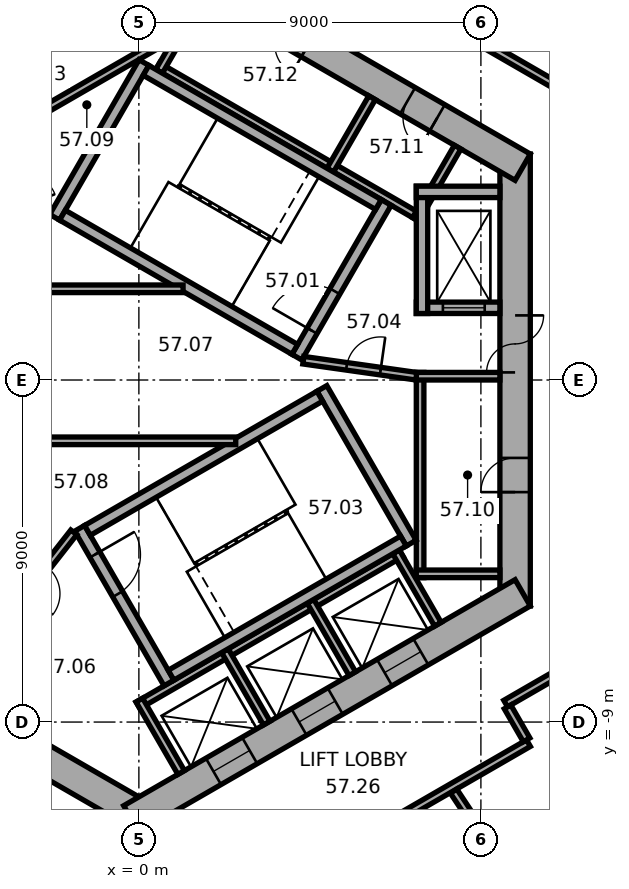
"""IFC4 building model, lengths in metres.
Left out: names, types, materials, properties, quantities, classifications, styles, units other than length and angle.
Written with IfcOpenShell. Run it as: python <this file> out.ifc"""

import sys

from ifc_helpers import new_model, si_unit, direction, frame, frame_2d, origin, place, context, subcontext, project, spatial, rectangle, extrude, element, fill, save


model = new_model("IFC4")
c1 = context("Model", 3, precision=1e-05, world=origin(), true_north=direction((0.0, 1.0)))
c2 = subcontext(c1, "Body", "Model", "MODEL_VIEW")
j1 = project(units=[si_unit("LENGTHUNIT", "METRE"), si_unit("PLANEANGLEUNIT", "RADIAN")], contexts=[c1])
p1 = place(None, origin())
s1 = spatial("IfcSite", under=j1, at=p1, CompositionType="ELEMENT")
p2 = place(p1, origin())
s2 = spatial("IfcBuilding", under=s1, at=p2, CompositionType="ELEMENT")
p3 = place(p2, frame((0.0, 0.0, 232.8)))
s3 = spatial("IfcBuildingStorey", under=s2, at=p3, CompositionType="ELEMENT", Elevation=232.8)
p4 = place(p3, frame((9.9, -5.947, 0.0), z_axis=(0.0, 0.0, 1.0), x_axis=(0.0, 1.0, 0.0)))
e1 = element("IfcWall", 1, at=p4, inside=s3, PredefinedType="SHEAR", context=c2, shape_type="SweptSolid", body=[
    extrude(rectangle(XDim=11.894, YDim=0.8, at=frame_2d((5.947, 0.0))), origin(), (0.0, 0.0, 1.0), 3.7),
])
p5 = place(p4, frame((6.147, 0.0, 0.0)))
e2 = element("IfcOpeningElement", 2, at=p5, cuts=e1, PredefinedType="OPENING", context=c2, shape_type="SweptSolid", body=[
    extrude(rectangle(XDim=1.5, YDim=2.1, at=frame_2d((0.75, 1.05))), frame((0.0, 0.41, 0.0), z_axis=(0.0, -1.0, 0.0), x_axis=(1.0, 0.0, 0.0)), (0.0, 0.0, 1.0), 0.82),
])
p6 = place(p4, frame((2.997, 0.0, 0.0)))
e3 = element("IfcOpeningElement", 3, at=p6, cuts=e1, PredefinedType="OPENING", context=c2, shape_type="SweptSolid", body=[
    extrude(rectangle(XDim=0.9, YDim=2.1, at=frame_2d((0.45, 1.05))), frame((0.0, 0.41, 0.0), z_axis=(0.0, -1.0, 0.0), x_axis=(1.0, 0.0, 0.0)), (0.0, 0.0, 1.0), 0.82),
])
p7 = place(p3, frame((10.1, 5.6, 0.0), z_axis=(0.0, 0.0, 1.0), x_axis=(-0.866023897231, 0.500002609418, 0.0)))
e4 = element("IfcWall", 4, at=p7, inside=s3, PredefinedType="SHEAR", context=c2, shape_type="SweptSolid", body=[
    extrude(rectangle(XDim=11.894, YDim=0.8, at=frame_2d((5.947, 0.0))), origin(), (0.0, 0.0, 1.0), 3.7),
])
p8 = place(p7, frame((2.597, 0.0, 0.0)))
e5 = element("IfcOpeningElement", 5, at=p8, cuts=e4, PredefinedType="OPENING", context=c2, shape_type="SweptSolid", body=[
    extrude(rectangle(XDim=0.9, YDim=2.1, at=frame_2d((0.45, 1.05))), frame((0.0, 0.41, 0.0), z_axis=(0.0, -1.0, 0.0), x_axis=(1.0, 0.0, 0.0)), (0.0, 0.0, 1.0), 0.82),
])
p9 = place(p7, frame((6.497, 0.0, 0.0)))
e6 = element("IfcOpeningElement", 6, at=p9, cuts=e4, PredefinedType="OPENING", context=c2, shape_type="SweptSolid", body=[
    extrude(rectangle(XDim=0.9, YDim=2.1, at=frame_2d((0.45, 1.05))), frame((0.0, 0.41, 0.0), z_axis=(0.0, -1.0, 0.0), x_axis=(1.0, 0.0, 0.0)), (0.0, 0.0, 1.0), 0.82),
])
p10 = place(p3, frame((0.2, 11.547, 0.0), z_axis=(0.0, 0.0, 1.0), x_axis=(-0.866023897231, -0.500002609418, 0.0)))
e7 = element("IfcWall", 7, at=p10, inside=s3, PredefinedType="SHEAR", context=c2, shape_type="SweptSolid", body=[
    extrude(rectangle(XDim=11.894, YDim=0.8, at=frame_2d((5.947, 0.0))), origin(), (0.0, 0.0, 1.0), 3.7),
])
p11 = place(p10, frame((6.147, 0.0, 0.0)))
e8 = element("IfcOpeningElement", 8, at=p11, cuts=e7, PredefinedType="OPENING", context=c2, shape_type="SweptSolid", body=[
    extrude(rectangle(XDim=1.5, YDim=2.1, at=frame_2d((0.75, 1.05))), frame((0.0, 0.41, 0.0), z_axis=(0.0, -1.0, 0.0), x_axis=(1.0, 0.0, 0.0)), (0.0, 0.0, 1.0), 0.82),
])
p12 = place(p10, frame((2.997, 0.0, 0.0)))
e9 = element("IfcOpeningElement", 9, at=p12, cuts=e7, PredefinedType="OPENING", context=c2, shape_type="SweptSolid", body=[
    extrude(rectangle(XDim=0.9, YDim=2.1, at=frame_2d((0.45, 1.05))), frame((0.0, 0.41, 0.0), z_axis=(0.0, -1.0, 0.0), x_axis=(1.0, 0.0, 0.0)), (0.0, 0.0, 1.0), 0.82),
])
p13 = place(p3, frame((-10.1, -5.6, 0.0), z_axis=(0.0, 0.0, 1.0), x_axis=(0.866023897231, -0.500002609418, 0.0)))
e10 = element("IfcWall", 10, at=p13, inside=s3, PredefinedType="SHEAR", context=c2, shape_type="SweptSolid", body=[
    extrude(rectangle(XDim=11.894, YDim=0.8, at=frame_2d((5.947, 0.0))), origin(), (0.0, 0.0, 1.0), 3.7),
])
p14 = place(p13, frame((6.147, 0.0, 0.0)))
e11 = element("IfcOpeningElement", 11, at=p14, cuts=e10, PredefinedType="OPENING", context=c2, shape_type="SweptSolid", body=[
    extrude(rectangle(XDim=1.5, YDim=2.1, at=frame_2d((0.75, 1.05))), frame((0.0, 0.41, 0.0), z_axis=(0.0, -1.0, 0.0), x_axis=(1.0, 0.0, 0.0)), (0.0, 0.0, 1.0), 0.82),
])
p15 = place(p13, frame((1.597, 0.0, 0.0)))
e12 = element("IfcOpeningElement", 12, at=p15, cuts=e10, PredefinedType="OPENING", context=c2, shape_type="SweptSolid", body=[
    extrude(rectangle(XDim=1.1, YDim=2.1, at=frame_2d((0.55, 1.05))), frame((0.0, 0.41, 0.0), z_axis=(0.0, -1.0, 0.0), x_axis=(1.0, 0.0, 0.0)), (0.0, 0.0, 1.0), 0.82),
])
p16 = place(p13, frame((4.197, 0.0, 0.0)))
e13 = element("IfcOpeningElement", 13, at=p16, cuts=e10, PredefinedType="OPENING", context=c2, shape_type="SweptSolid", body=[
    extrude(rectangle(XDim=1.1, YDim=2.1, at=frame_2d((0.55, 1.05))), frame((0.0, 0.41, 0.0), z_axis=(0.0, -1.0, 0.0), x_axis=(1.0, 0.0, 0.0)), (0.0, 0.0, 1.0), 0.82),
])
p17 = place(p3, frame((-0.2, -11.547, 0.0), z_axis=(0.0, 0.0, 1.0), x_axis=(0.866023897231, 0.500002609418, 0.0)))
e14 = element("IfcWall", 14, at=p17, inside=s3, PredefinedType="SHEAR", context=c2, shape_type="SweptSolid", body=[
    extrude(rectangle(XDim=11.894, YDim=0.8, at=frame_2d((5.947, 0.0))), origin(), (0.0, 0.0, 1.0), 3.7),
])
p18 = place(p17, frame((2.497, 0.0, 0.0)))
e15 = element("IfcOpeningElement", 15, at=p18, cuts=e14, PredefinedType="OPENING", context=c2, shape_type="SweptSolid", body=[
    extrude(rectangle(XDim=1.1, YDim=2.1, at=frame_2d((0.55, 1.05))), frame((0.0, 0.41, 0.0), z_axis=(0.0, -1.0, 0.0), x_axis=(1.0, 0.0, 0.0)), (0.0, 0.0, 1.0), 0.82),
])
p19 = place(p17, frame((5.097, 0.0, 0.0)))
e16 = element("IfcOpeningElement", 16, at=p19, cuts=e14, PredefinedType="OPENING", context=c2, shape_type="SweptSolid", body=[
    extrude(rectangle(XDim=1.1, YDim=2.1, at=frame_2d((0.55, 1.05))), frame((0.0, 0.41, 0.0), z_axis=(0.0, -1.0, 0.0), x_axis=(1.0, 0.0, 0.0)), (0.0, 0.0, 1.0), 0.82),
])
p20 = place(p17, frame((7.697, 0.0, 0.0)))
e17 = element("IfcOpeningElement", 17, at=p20, cuts=e14, PredefinedType="OPENING", context=c2, shape_type="SweptSolid", body=[
    extrude(rectangle(XDim=1.1, YDim=2.1, at=frame_2d((0.55, 1.05))), frame((0.0, 0.41, 0.0), z_axis=(0.0, -1.0, 0.0), x_axis=(1.0, 0.0, 0.0)), (0.0, 0.0, 1.0), 0.82),
])
p21 = place(p3, frame((7.4, -5.2, 0.0), z_axis=(0.0, 0.0, 1.0), x_axis=(0.0, 1.0, 0.0)))
e18 = element("IfcWall", 18, at=p21, inside=s3, PredefinedType="PARTITIONING", context=c2, shape_type="SweptSolid", body=[
    extrude(rectangle(XDim=5.4, YDim=0.2, at=frame_2d((2.7, 0.0))), origin(), (0.0, 0.0, 1.0), 3.42),
])
for number, where, z_axis, x_axis in (
    (19, (7.3, -5.1, 0.0), (0.0, 0.0, 1.0), (1.0, 0.0, 0.0)),
    (20, (7.3, 0.1, 0.0), (0.0, 0.0, 1.0), (1.0, 0.0, 0.0)),
):
    element("IfcWall", number, at=place(p3, frame(where, z_axis=z_axis, x_axis=x_axis)), inside=s3, PredefinedType="PARTITIONING", context=c2, shape_type="SweptSolid", body=[
        extrude(rectangle(XDim=2.2, YDim=0.2, at=frame_2d((1.1, 0.0))), origin(), (0.0, 0.0, 1.0), 3.42),
    ])
p22 = place(p3, frame((7.424, 4.259, 0.0), z_axis=(0.0, 0.0, 1.0), x_axis=(-0.866026010844, 0.49999894854, 0.0)))
e21 = element("IfcWall", 21, at=p22, inside=s3, PredefinedType="PARTITIONING", context=c2, shape_type="SweptSolid", body=[
    extrude(rectangle(XDim=8.0, YDim=0.2, at=frame_2d((4.0, 0.0))), origin(), (0.0, 0.0, 1.0), 3.42),
])
for number, where, z_axis, x_axis in (
    (22, (7.287, 4.222, 0.0), (0.0, 0.0, 1.0), (0.5, 0.866, 0.0)),
    (23, (5.036, 5.522, 0.0), (0.0, 0.0, 1.0), (0.5, 0.866, 0.0)),
    (24, (0.532, 8.122, 0.0), (0.0, 0.0, 1.0), (0.5, 0.866, 0.0)),
):
    element("IfcWall", number, at=place(p3, frame(where, z_axis=z_axis, x_axis=x_axis)), inside=s3, PredefinedType="PARTITIONING", context=c2, shape_type="SweptSolid", body=[
        extrude(rectangle(XDim=2.2, YDim=0.2, at=frame_2d((1.1, 0.0))), origin(), (0.0, 0.0, 1.0), 3.42),
    ])
p23 = place(p3, frame((0.803, 9.009, 0.0), z_axis=(0.0, 0.0, 1.0), x_axis=(-0.866028230842, -0.499995103361, 0.0)))
e25 = element("IfcWall", 25, at=p23, inside=s3, PredefinedType="PARTITIONING", context=c2, shape_type="SweptSolid", body=[
    extrude(rectangle(XDim=5.4, YDim=0.2, at=frame_2d((2.7, 0.0))), origin(), (0.0, 0.0, 1.0), 3.42),
])
p24 = place(p3, frame((-0.024, -8.559, 0.0), z_axis=(0.0, 0.0, 1.0), x_axis=(0.866026010844, 0.49999894854, 0.0)))
e26 = element("IfcWall", 26, at=p24, inside=s3, PredefinedType="PARTITIONING", context=c2, shape_type="SweptSolid", body=[
    extrude(rectangle(XDim=8.0, YDim=0.2, at=frame_2d((4.0, 0.0))), origin(), (0.0, 0.0, 1.0), 3.42),
])
for number, where, z_axis, x_axis in (
    (27, (0.013, -8.422, 0.0), (0.0, 0.0, 1.0), (0.5, -0.866, 0.0)),
    (28, (2.264, -7.122, 0.0), (0.0, 0.0, 1.0), (0.5, -0.866, 0.0)),
    (29, (4.516, -5.822, 0.0), (0.0, 0.0, 1.0), (0.5, -0.866, 0.0)),
    (30, (6.768, -4.522, 0.0), (0.0, 0.0, 1.0), (0.5, -0.866, 0.0)),
):
    element("IfcWall", number, at=place(p3, frame(where, z_axis=z_axis, x_axis=x_axis)), inside=s3, PredefinedType="PARTITIONING", context=c2, shape_type="SweptSolid", body=[
        extrude(rectangle(XDim=2.2, YDim=0.2, at=frame_2d((1.1, 0.0))), origin(), (0.0, 0.0, 1.0), 3.42),
    ])
p25 = place(p3, frame((4.158, 0.602, 0.0), z_axis=(0.0, 0.0, 1.0), x_axis=(0.499977259774, 0.866038532462, 0.0)))
e31 = element("IfcWall", 31, at=p25, inside=s3, PredefinedType="SHEAR", context=c2, shape_type="SweptSolid", body=[
    extrude(rectangle(XDim=4.7, YDim=0.3, at=frame_2d((2.35, 0.0))), origin(), (0.0, 0.0, 1.0), 3.42),
])
p26 = place(p25, frame((0.8, 0.0, 0.0)))
e32 = element("IfcOpeningElement", 32, at=p26, cuts=e31, PredefinedType="OPENING", context=c2, shape_type="SweptSolid", body=[
    extrude(rectangle(XDim=1.2, YDim=2.1, at=frame_2d((0.6, 1.05))), frame((0.0, 0.16, 0.0), z_axis=(0.0, -1.0, 0.0), x_axis=(1.0, 0.0, 0.0)), (0.0, 0.0, 1.0), 0.32),
])
p27 = place(p3, frame((-2.216, 4.282, 0.0), z_axis=(0.0, 0.0, 1.0), x_axis=(0.499977259774, 0.866038532462, 0.0)))
e33 = element("IfcWall", 33, at=p27, inside=s3, PredefinedType="SHEAR", context=c2, shape_type="SweptSolid", body=[
    extrude(rectangle(XDim=4.7, YDim=0.3, at=frame_2d((2.35, 0.0))), origin(), (0.0, 0.0, 1.0), 3.42),
])
for number, where, z_axis, x_axis in (
    (34, (4.103, 0.807, 0.0), (0.0, 0.0, 1.0), (-0.866, 0.5, 0.0)),
    (35, (6.303, 4.617, 0.0), (0.0, 0.0, 1.0), (-0.866, 0.5, 0.0)),
):
    element("IfcWall", number, at=place(p3, frame(where, z_axis=z_axis, x_axis=x_axis)), inside=s3, PredefinedType="SHEAR", context=c2, shape_type="SweptSolid", body=[
        extrude(rectangle(XDim=7.06, YDim=0.3, at=frame_2d((3.53, 0.0))), origin(), (0.0, 0.0, 1.0), 3.42),
    ])
p28 = place(p3, frame((-1.558, -3.902, 0.0), z_axis=(0.0, 0.0, 1.0), x_axis=(0.499977259774, -0.866038532462, 0.0)))
e36 = element("IfcWall", 36, at=p28, inside=s3, PredefinedType="SHEAR", context=c2, shape_type="SweptSolid", body=[
    extrude(rectangle(XDim=4.7, YDim=0.3, at=frame_2d((2.35, 0.0))), origin(), (0.0, 0.0, 1.0), 3.42),
])
p29 = place(p28, frame((0.8, 0.0, 0.0)))
e37 = element("IfcOpeningElement", 37, at=p29, cuts=e36, PredefinedType="OPENING", context=c2, shape_type="SweptSolid", body=[
    extrude(rectangle(XDim=1.2, YDim=2.1, at=frame_2d((0.6, 1.05))), frame((0.0, 0.16, 0.0), z_axis=(0.0, -1.0, 0.0), x_axis=(1.0, 0.0, 0.0)), (0.0, 0.0, 1.0), 0.32),
])
p30 = place(p3, frame((4.816, -0.222, 0.0), z_axis=(0.0, 0.0, 1.0), x_axis=(0.499977259774, -0.866038532462, 0.0)))
e38 = element("IfcWall", 38, at=p30, inside=s3, PredefinedType="SHEAR", context=c2, shape_type="SweptSolid", body=[
    extrude(rectangle(XDim=4.7, YDim=0.3, at=frame_2d((2.35, 0.0))), origin(), (0.0, 0.0, 1.0), 3.42),
])
for number, where, z_axis, x_axis in (
    (39, (-1.353, -3.957, 0.0), (0.0, 0.0, 1.0), (0.866, 0.5, 0.0)),
    (40, (0.847, -7.767, 0.0), (0.0, 0.0, 1.0), (0.866, 0.5, 0.0)),
):
    element("IfcWall", number, at=place(p3, frame(where, z_axis=z_axis, x_axis=x_axis)), inside=s3, PredefinedType="SHEAR", context=c2, shape_type="SweptSolid", body=[
        extrude(rectangle(XDim=7.06, YDim=0.3, at=frame_2d((3.53, 0.0))), origin(), (0.0, 0.0, 1.0), 3.42),
    ])
p31 = place(p3, frame((7.3, 1.9, 0.0), z_axis=(0.0, 0.0, 1.0), x_axis=(1.0, 0.0, 0.0)))
e41 = element("IfcWall", 41, at=p31, inside=s3, PredefinedType="SHEAR", context=c2, shape_type="SweptSolid", body=[
    extrude(rectangle(XDim=2.2, YDim=0.3, at=frame_2d((1.1, 0.0))), origin(), (0.0, 0.0, 1.0), 3.42),
])
p32 = place(p31, frame((0.7, 0.0, 0.0)))
e42 = element("IfcOpeningElement", 42, at=p32, cuts=e41, PredefinedType="OPENING", context=c2, shape_type="SweptSolid", body=[
    extrude(rectangle(XDim=1.1, YDim=2.1, at=frame_2d((0.55, 1.05))), frame((0.0, 0.16, 0.0), z_axis=(0.0, -1.0, 0.0), x_axis=(1.0, 0.0, 0.0)), (0.0, 0.0, 1.0), 0.32),
])
p33 = place(p3, frame((7.45, 1.75, 0.0), z_axis=(0.0, 0.0, 1.0), x_axis=(0.0, 1.0, 0.0)))
e43 = element("IfcWall", 43, at=p33, inside=s3, PredefinedType="SHEAR", context=c2, shape_type="SweptSolid", body=[
    extrude(rectangle(XDim=3.35, YDim=0.3, at=frame_2d((1.675, 0.0))), origin(), (0.0, 0.0, 1.0), 3.42),
])
p34 = place(p3, frame((7.3, 4.95, 0.0), z_axis=(0.0, 0.0, 1.0), x_axis=(1.0, 0.0, 0.0)))
e44 = element("IfcWall", 44, at=p34, inside=s3, PredefinedType="SHEAR", context=c2, shape_type="SweptSolid", body=[
    extrude(rectangle(XDim=2.2, YDim=0.3, at=frame_2d((1.1, 0.0))), origin(), (0.0, 0.0, 1.0), 3.42),
])
p35 = place(p3, frame((4.327, 0.521, 0.0), z_axis=(0.0, 0.0, 1.0), x_axis=(0.990124376366, -0.14019172346, 0.0)))
e45 = element("IfcWall", 45, at=p35, inside=s3, PredefinedType="PARTITIONING", context=c2, shape_type="SweptSolid", body=[
    extrude(rectangle(XDim=3.002, YDim=0.2, at=frame_2d((1.501, 0.0))), origin(), (0.0, 0.0, 1.0), 3.42),
])
p36 = place(p35, frame((1.15, 0.0, 0.0)))
e46 = element("IfcOpeningElement", 46, at=p36, cuts=e45, PredefinedType="OPENING", context=c2, shape_type="SweptSolid", body=[
    extrude(rectangle(XDim=0.9, YDim=2.1, at=frame_2d((0.45, 1.05))), frame((0.0, 0.11, 0.0), z_axis=(0.0, -1.0, 0.0), x_axis=(1.0, 0.0, 0.0)), (0.0, 0.0, 1.0), 0.22),
])
p37 = place(p3, frame((-1.712, -4.008, 0.0), z_axis=(0.0, 0.0, 1.0), x_axis=(-0.616549420702, -0.787316208287, 0.0)))
e47 = element("IfcWall", 47, at=p37, inside=s3, PredefinedType="PARTITIONING", context=c2, shape_type="SweptSolid", body=[
    extrude(rectangle(XDim=3.002, YDim=0.2, at=frame_2d((1.501, 0.0))), origin(), (0.0, 0.0, 1.0), 3.42),
])
p38 = place(p37, frame((1.15, 0.0, 0.0)))
e48 = element("IfcOpeningElement", 48, at=p38, cuts=e47, PredefinedType="OPENING", context=c2, shape_type="SweptSolid", body=[
    extrude(rectangle(XDim=0.9, YDim=2.1, at=frame_2d((0.45, 1.05))), frame((0.0, 0.11, 0.0), z_axis=(0.0, -1.0, 0.0), x_axis=(1.0, 0.0, 0.0)), (0.0, 0.0, 1.0), 0.22),
])
p39 = place(p3, frame((-2.72, -1.6, 0.0), z_axis=(0.0, 0.0, 1.0), x_axis=(1.0, 0.0, 0.0)))
e49 = element("IfcWall", 49, at=p39, inside=s3, PredefinedType="PARTITIONING", context=c2, shape_type="SweptSolid", body=[
    extrude(rectangle(XDim=5.269, YDim=0.2, at=frame_2d((2.634, 0.0))), origin(), (0.0, 0.0, 1.0), 3.42),
])
p40 = place(p3, frame((-2.72, 2.4, 0.0), z_axis=(0.0, 0.0, 1.0), x_axis=(1.0, 0.0, 0.0)))
e50 = element("IfcWall", 50, at=p40, inside=s3, PredefinedType="PARTITIONING", context=c2, shape_type="SweptSolid", body=[
    extrude(rectangle(XDim=3.883, YDim=0.2, at=frame_2d((1.941, 0.0))), origin(), (0.0, 0.0, 1.0), 3.42),
])
p41 = place(p3, frame((2.716, -13.906, 0.0), z_axis=(0.0, 0.0, 1.0), x_axis=(0.866040290674, 0.499974214264, 0.0)))
e51 = element("IfcWall", 51, at=p41, inside=s3, PredefinedType="PARTITIONING", context=c2, shape_type="SweptSolid", body=[
    extrude(rectangle(XDim=8.702, YDim=0.2, at=frame_2d((4.351, 0.0))), origin(), (0.0, 0.0, 1.0), 3.42),
])
p42 = place(p41, frame((2.679, 0.0, 0.0)))
e52 = element("IfcOpeningElement", 52, at=p42, cuts=e51, PredefinedType="OPENING", context=c2, shape_type="SweptSolid", body=[
    extrude(rectangle(XDim=1.0, YDim=2.1, at=frame_2d((0.5, 1.05))), frame((0.0, 0.11, 0.0), z_axis=(0.0, -1.0, 0.0), x_axis=(1.0, 0.0, 0.0)), (0.0, 0.0, 1.0), 0.22),
])
p43 = place(p3, frame((9.652, -8.515, 0.0), z_axis=(0.0, 0.0, 1.0), x_axis=(0.866020375458, 0.500008709215, 0.0)))
e53 = element("IfcWall", 53, at=p43, inside=s3, PredefinedType="PARTITIONING", context=c2, shape_type="SweptSolid", body=[
    extrude(rectangle(XDim=1.846, YDim=0.2, at=frame_2d((0.923, 0.0))), origin(), (0.0, 0.0, 1.0), 3.42),
])
p44 = place(p3, frame((10.202, -9.469, 0.0), z_axis=(0.0, 0.0, 1.0), x_axis=(-0.499968756647, 0.866043441391, 0.0)))
e54 = element("IfcWall", 54, at=p44, inside=s3, PredefinedType="PARTITIONING", context=c2, shape_type="SweptSolid", body=[
    extrude(rectangle(XDim=1.001, YDim=0.2, at=frame_2d((0.5, 0.0))), origin(), (0.0, 0.0, 1.0), 3.42),
])
p45 = place(p3, frame((11.033, 7.717, 0.0), z_axis=(0.0, 0.0, 1.0), x_axis=(-0.865996816683, 0.500049511043, 0.0)))
e55 = element("IfcWall", 55, at=p45, inside=s3, PredefinedType="PARTITIONING", context=c2, shape_type="SweptSolid", body=[
    extrude(rectangle(XDim=2.8, YDim=0.2, at=frame_2d((1.4, 0.0))), origin(), (0.0, 0.0, 1.0), 3.42),
])
p46 = place(p3, frame((11.571, -15.786, 0.0), z_axis=(0.0, 0.0, 1.0), x_axis=(-0.551944861763, 0.833880608705, 0.0)))
e56 = element("IfcWall", 56, at=p46, inside=s3, PredefinedType="PARTITIONING", context=c2, shape_type="SweptSolid", body=[
    extrude(rectangle(XDim=5.957, YDim=0.2, at=frame_2d((2.979, 0.0))), origin(), (0.0, 0.0, 1.0), 3.42),
])
p47 = place(p5, origin())
e57 = element("IfcDoor", 57, at=p47, inside=s3, OperationType="DOUBLE_DOOR_SINGLE_SWING", PredefinedType="DOOR", context=c2, shape_type="SweptSolid", body=[
    extrude(rectangle(XDim=1.5, YDim=2.1, at=frame_2d((0.75, 1.05))), frame((0.0, 0.025, 0.0), z_axis=(0.0, -1.0, 0.0), x_axis=(1.0, 0.0, 0.0)), (0.0, 0.0, 1.0), 0.05),
])
fill(e2, e57)
p48 = place(p26, origin())
e58 = element("IfcDoor", 58, at=p48, inside=s3, OperationType="SINGLE_SWING_RIGHT", PredefinedType="DOOR", context=c2, shape_type="SweptSolid", body=[
    extrude(rectangle(XDim=1.2, YDim=2.1, at=frame_2d((0.6, 1.05))), frame((0.0, 0.025, 0.0), z_axis=(0.0, -1.0, 0.0), x_axis=(1.0, 0.0, 0.0)), (0.0, 0.0, 1.0), 0.05),
])
fill(e32, e58)
p49 = place(p29, origin())
e59 = element("IfcDoor", 59, at=p49, inside=s3, OperationType="SINGLE_SWING_RIGHT", PredefinedType="DOOR", context=c2, shape_type="SweptSolid", body=[
    extrude(rectangle(XDim=1.2, YDim=2.1, at=frame_2d((0.6, 1.05))), frame((0.0, 0.025, 0.0), z_axis=(0.0, -1.0, 0.0), x_axis=(1.0, 0.0, 0.0)), (0.0, 0.0, 1.0), 0.05),
])
fill(e37, e59)
p50 = place(p36, origin())
e60 = element("IfcDoor", 60, at=p50, inside=s3, OperationType="SINGLE_SWING_LEFT", PredefinedType="DOOR", context=c2, shape_type="SweptSolid", body=[
    extrude(rectangle(XDim=0.9, YDim=2.1, at=frame_2d((0.45, 1.05))), frame((0.0, 0.025, 0.0), z_axis=(0.0, -1.0, 0.0), x_axis=(1.0, 0.0, 0.0)), (0.0, 0.0, 1.0), 0.05),
])
fill(e46, e60)
p51 = place(p6, origin())
e61 = element("IfcDoor", 61, at=p51, inside=s3, OperationType="SINGLE_SWING_LEFT", PredefinedType="DOOR", context=c2, shape_type="SweptSolid", body=[
    extrude(rectangle(XDim=0.9, YDim=2.1, at=frame_2d((0.45, 1.05))), frame((0.0, 0.025, 0.0), z_axis=(0.0, -1.0, 0.0), x_axis=(1.0, 0.0, 0.0)), (0.0, 0.0, 1.0), 0.05),
])
fill(e3, e61)
p52 = place(p8, origin())
e62 = element("IfcDoor", 62, at=p52, inside=s3, OperationType="SINGLE_SWING_LEFT", PredefinedType="DOOR", context=c2, shape_type="SweptSolid", body=[
    extrude(rectangle(XDim=0.9, YDim=2.1, at=frame_2d((0.45, 1.05))), frame((0.0, 0.025, 0.0), z_axis=(0.0, -1.0, 0.0), x_axis=(1.0, 0.0, 0.0)), (0.0, 0.0, 1.0), 0.05),
])
fill(e5, e62)
p53 = place(p32, origin())
e63 = element("IfcDoor", 63, at=p53, inside=s3, OperationType="DOUBLE_DOOR_SLIDING", PredefinedType="DOOR", context=c2, shape_type="SweptSolid", body=[
    extrude(rectangle(XDim=1.1, YDim=2.1, at=frame_2d((0.55, 1.05))), frame((0.0, 0.025, 0.0), z_axis=(0.0, -1.0, 0.0), x_axis=(1.0, 0.0, 0.0)), (0.0, 0.0, 1.0), 0.05),
])
fill(e42, e63)
p54 = place(p18, origin())
e64 = element("IfcDoor", 64, at=p54, inside=s3, OperationType="DOUBLE_DOOR_SLIDING", PredefinedType="DOOR", context=c2, shape_type="SweptSolid", body=[
    extrude(rectangle(XDim=1.1, YDim=2.1, at=frame_2d((0.55, 1.05))), frame((0.0, 0.025, 0.0), z_axis=(0.0, -1.0, 0.0), x_axis=(1.0, 0.0, 0.0)), (0.0, 0.0, 1.0), 0.05),
])
fill(e15, e64)
p55 = place(p19, origin())
e65 = element("IfcDoor", 65, at=p55, inside=s3, OperationType="DOUBLE_DOOR_SLIDING", PredefinedType="DOOR", context=c2, shape_type="SweptSolid", body=[
    extrude(rectangle(XDim=1.1, YDim=2.1, at=frame_2d((0.55, 1.05))), frame((0.0, 0.025, 0.0), z_axis=(0.0, -1.0, 0.0), x_axis=(1.0, 0.0, 0.0)), (0.0, 0.0, 1.0), 0.05),
])
fill(e16, e65)
p56 = place(p20, origin())
e66 = element("IfcDoor", 66, at=p56, inside=s3, OperationType="DOUBLE_DOOR_SLIDING", PredefinedType="DOOR", context=c2, shape_type="SweptSolid", body=[
    extrude(rectangle(XDim=1.1, YDim=2.1, at=frame_2d((0.55, 1.05))), frame((0.0, 0.025, 0.0), z_axis=(0.0, -1.0, 0.0), x_axis=(1.0, 0.0, 0.0)), (0.0, 0.0, 1.0), 0.05),
])
fill(e17, e66)
save(model, sys.argv[1])
